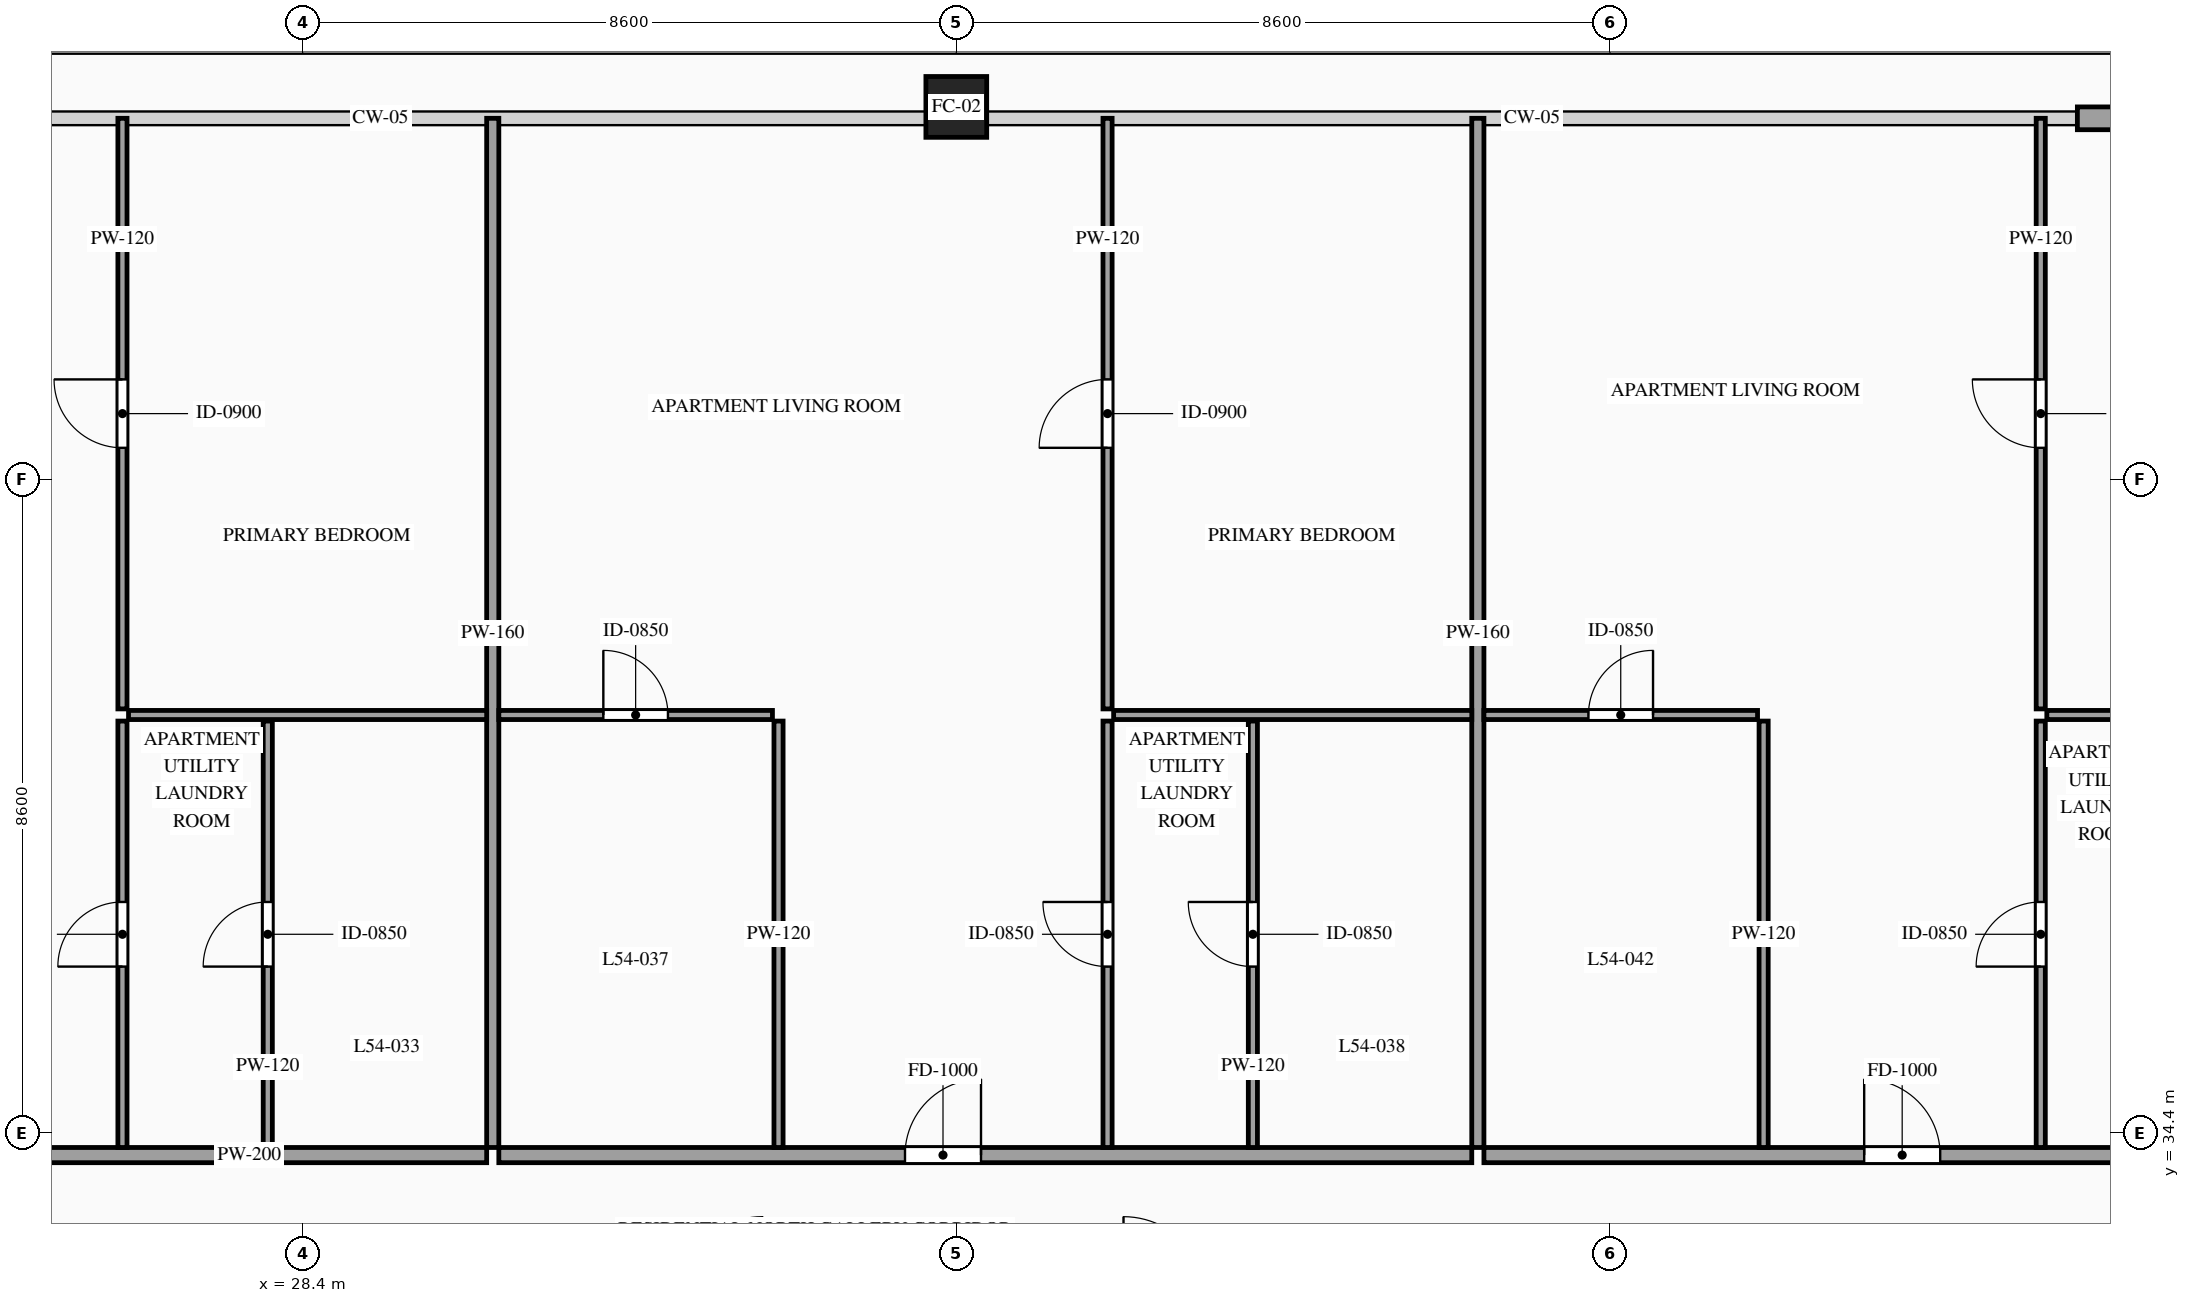
"""IFC4 building model, lengths in metres.
Left out: names, types, materials, properties, quantities, classifications, styles, units other than length and angle.
Written with IfcOpenShell. Run it as: python <this file> out.ifc"""

import sys

from ifc_helpers import new_model, si_unit, direction, frame, frame_2d, origin, origin_2d, place, context, subcontext, project, spatial, rectangle, hollow_rectangle, extrude, source, transform, mapped, element, fill, save


model = new_model("IFC4")
c1 = context("Model", 3, precision=1e-05, world=origin(), true_north=direction((0.0, 1.0)))
c2 = subcontext(c1, "Body", "Model", "MODEL_VIEW")
j1 = project(units=[si_unit("LENGTHUNIT", "METRE"), si_unit("PLANEANGLEUNIT", "RADIAN")], contexts=[c1])
p1 = place(None, origin())
s1 = spatial("IfcSite", under=j1, at=p1, CompositionType="ELEMENT")
p2 = place(p1, origin())
s2 = spatial("IfcBuilding", under=s1, at=p2, CompositionType="ELEMENT")
p3 = place(p2, frame((0.0, 0.0, 205.5)))
s3 = spatial("IfcBuildingStorey", under=s2, at=p3, CompositionType="ELEMENT", Elevation=205.5)
m1 = source(origin(), c2, "Body", "SweptSolid", [
    extrude(hollow_rectangle(XDim=0.8, YDim=0.8, WallThickness=0.036, at=origin_2d()), origin(), (0.0, 0.0, 1.0), 3.5),
])
p4 = place(p3, frame((37.0, 47.9, 0.0), z_axis=(0.0, 0.0, 1.0), x_axis=(1.0, 0.0, 0.0)))
e1 = element("IfcColumn", 1, at=p4, inside=s3, PredefinedType="COLUMN", context=c2, shape_type="MappedRepresentation", body=[
    mapped(m1, transform((0.0, 0.0, 0.0), scale=1.0)),
])
m2 = source(origin(), c2, "Body", "SweptSolid", [
    extrude(rectangle(XDim=3.05, YDim=0.3, at=frame_2d((1.525, 0.0))), origin(), (0.0, 0.0, 1.0), 2.835),
])
p5 = place(p3, frame((51.75, 47.75, 0.0), z_axis=(0.0, 0.0, 1.0), x_axis=(1.0, 0.0, 0.0)))
e2 = element("IfcWall", 2, at=p5, inside=s3, PredefinedType="SOLIDWALL", context=c2, shape_type="MappedRepresentation", body=[
    mapped(m2, transform((0.0, 0.0, 0.0), scale=1.0)),
])
p6 = place(p3, frame((17.94, 34.11, 0.0), z_axis=(0.0, 0.0, 1.0), x_axis=(1.0, 0.0, 0.0)))
e3 = element("IfcWall", 3, at=p6, inside=s3, PredefinedType="PARTITIONING", context=c2, shape_type="SweptSolid", body=[
    extrude(rectangle(XDim=12.881, YDim=0.2, at=frame_2d((6.44, 0.0))), origin(), (0.0, 0.0, 1.0), 3.28),
])
p7 = place(p6, frame((5.385, 0.0, 0.0)))
e4 = element("IfcOpeningElement", 4, at=p7, cuts=e3, PredefinedType="OPENING", context=c2, shape_type="SweptSolid", body=[
    extrude(rectangle(XDim=1.0, YDim=2.2, at=frame_2d((0.5, 1.1))), frame((0.0, 0.115, 0.0), z_axis=(0.0, -1.0, 0.0), x_axis=(1.0, 0.0, 0.0)), (0.0, 0.0, 1.0), 0.23),
])
m3 = source(origin(), c2, "Body", "SweptSolid", [
    extrude(rectangle(XDim=13.54, YDim=0.16, at=frame_2d((6.77, 0.0))), origin(), (0.0, 0.0, 1.0), 3.28),
])
p8 = place(p3, frame((30.901, 34.21, 0.0), z_axis=(0.0, 0.0, 1.0), x_axis=(0.0, 1.0, 0.0)))
e5 = element("IfcWall", 5, at=p8, inside=s3, PredefinedType="PARTITIONING", context=c2, shape_type="MappedRepresentation", body=[
    mapped(m3, transform((0.0, 0.0, 0.0), scale=1.0)),
])
p9 = place(p3, frame((27.941, 34.21, 0.0), z_axis=(0.0, 0.0, 1.0), x_axis=(0.0, 1.0, 0.0)))
e6 = element("IfcWall", 6, at=p9, inside=s3, PredefinedType="PARTITIONING", context=c2, shape_type="SweptSolid", body=[
    extrude(rectangle(XDim=5.61, YDim=0.12, at=frame_2d((2.805, 0.0))), origin(), (0.0, 0.0, 1.0), 3.28),
])
p10 = place(p9, frame((2.38, 0.0, 0.0)))
e7 = element("IfcOpeningElement", 7, at=p10, cuts=e6, PredefinedType="OPENING", context=c2, shape_type="SweptSolid", body=[
    extrude(rectangle(XDim=0.85, YDim=2.1, at=frame_2d((0.425, 1.05))), frame((0.0, 0.075, 0.0), z_axis=(0.0, -1.0, 0.0), x_axis=(1.0, 0.0, 0.0)), (0.0, 0.0, 1.0), 0.15),
])
m4 = source(origin(), c2, "Body", "SweptSolid", [
    extrude(rectangle(XDim=4.712, YDim=0.12, at=frame_2d((2.356, 0.0))), origin(), (0.0, 0.0, 1.0), 2.875),
])
p11 = place(p3, frame((26.109, 39.9, 0.0), z_axis=(0.0, 0.0, 1.0), x_axis=(1.0, 0.0, 0.0)))
e8 = element("IfcWall", 8, at=p11, inside=s3, PredefinedType="PARTITIONING", context=c2, shape_type="MappedRepresentation", body=[
    mapped(m4, transform((0.0, 0.0, 0.0), scale=1.0)),
])
p12 = place(p3, frame((26.029, 39.98, 0.0), z_axis=(0.0, 0.0, 1.0), x_axis=(0.0, 1.0, 0.0)))
e9 = element("IfcWall", 9, at=p12, inside=s3, PredefinedType="PARTITIONING", context=c2, shape_type="SweptSolid", body=[
    extrude(rectangle(XDim=7.77, YDim=0.12, at=frame_2d((3.885, 0.0))), origin(), (0.0, 0.0, 1.0), 3.28),
])
p13 = place(p12, frame((3.435, 0.0, 0.0)))
e10 = element("IfcOpeningElement", 10, at=p13, cuts=e9, PredefinedType="OPENING", context=c2, shape_type="SweptSolid", body=[
    extrude(rectangle(XDim=0.9, YDim=2.15, at=frame_2d((0.45, 1.075))), frame((0.0, 0.075, 0.0), z_axis=(0.0, -1.0, 0.0), x_axis=(1.0, 0.0, 0.0)), (0.0, 0.0, 1.0), 0.15),
])
p14 = place(p3, frame((26.029, 34.21, 0.0), z_axis=(0.0, 0.0, 1.0), x_axis=(0.0, 1.0, 0.0)))
e11 = element("IfcWall", 11, at=p14, inside=s3, PredefinedType="PARTITIONING", context=c2, shape_type="SweptSolid", body=[
    extrude(rectangle(XDim=5.61, YDim=0.12, at=frame_2d((2.805, 0.0))), origin(), (0.0, 0.0, 1.0), 3.28),
])
p15 = place(p14, frame((2.38, 0.0, 0.0)))
e12 = element("IfcOpeningElement", 12, at=p15, cuts=e11, PredefinedType="OPENING", context=c2, shape_type="SweptSolid", body=[
    extrude(rectangle(XDim=0.85, YDim=2.1, at=frame_2d((0.425, 1.05))), frame((0.0, 0.075, 0.0), z_axis=(0.0, -1.0, 0.0), x_axis=(1.0, 0.0, 0.0)), (0.0, 0.0, 1.0), 0.15),
])
p16 = place(p3, frame((30.981, 34.11, 0.0), z_axis=(0.0, 0.0, 1.0), x_axis=(1.0, 0.0, 0.0)))
e13 = element("IfcWall", 13, at=p16, inside=s3, PredefinedType="PARTITIONING", context=c2, shape_type="SweptSolid", body=[
    extrude(rectangle(XDim=12.801, YDim=0.2, at=frame_2d((6.4, 0.0))), origin(), (0.0, 0.0, 1.0), 3.28),
])
p17 = place(p16, frame((5.344, 0.0, 0.0)))
e14 = element("IfcOpeningElement", 14, at=p17, cuts=e13, PredefinedType="OPENING", context=c2, shape_type="SweptSolid", body=[
    extrude(rectangle(XDim=1.0, YDim=2.2, at=frame_2d((0.5, 1.1))), frame((0.0, 0.115, 0.0), z_axis=(0.0, -1.0, 0.0), x_axis=(1.0, 0.0, 0.0)), (0.0, 0.0, 1.0), 0.23),
])
p18 = place(p3, frame((43.862, 34.21, 0.0), z_axis=(0.0, 0.0, 1.0), x_axis=(0.0, 1.0, 0.0)))
e15 = element("IfcWall", 15, at=p18, inside=s3, PredefinedType="PARTITIONING", context=c2, shape_type="MappedRepresentation", body=[
    mapped(m3, transform((0.0, 0.0, 0.0), scale=1.0)),
])
p19 = place(p3, frame((30.981, 39.9, 0.0), z_axis=(0.0, 0.0, 1.0), x_axis=(1.0, 0.0, 0.0)))
e16 = element("IfcWall", 16, at=p19, inside=s3, PredefinedType="PARTITIONING", context=c2, shape_type="SweptSolid", body=[
    extrude(rectangle(XDim=3.6, YDim=0.12, at=frame_2d((1.8, 0.0))), origin(), (0.0, 0.0, 1.0), 2.875),
])
p20 = place(p19, frame((1.375, 0.0, 0.0)))
e17 = element("IfcOpeningElement", 17, at=p20, cuts=e16, PredefinedType="OPENING", context=c2, shape_type="SweptSolid", body=[
    extrude(rectangle(XDim=0.85, YDim=2.1, at=frame_2d((0.425, 1.05))), frame((0.0, 0.075, 0.0), z_axis=(0.0, -1.0, 0.0), x_axis=(1.0, 0.0, 0.0)), (0.0, 0.0, 1.0), 0.15),
])
m5 = source(origin(), c2, "Body", "SweptSolid", [
    extrude(rectangle(XDim=5.61, YDim=0.12, at=frame_2d((2.805, 0.0))), origin(), (0.0, 0.0, 1.0), 3.28),
])
p21 = place(p3, frame((34.661, 34.21, 0.0), z_axis=(0.0, 0.0, 1.0), x_axis=(0.0, 1.0, 0.0)))
e18 = element("IfcWall", 18, at=p21, inside=s3, PredefinedType="PARTITIONING", context=c2, shape_type="MappedRepresentation", body=[
    mapped(m5, transform((0.0, 0.0, 0.0), scale=1.0)),
])
p22 = place(p3, frame((40.902, 34.21, 0.0), z_axis=(0.0, 0.0, 1.0), x_axis=(0.0, 1.0, 0.0)))
e19 = element("IfcWall", 19, at=p22, inside=s3, PredefinedType="PARTITIONING", context=c2, shape_type="SweptSolid", body=[
    extrude(rectangle(XDim=5.61, YDim=0.12, at=frame_2d((2.805, 0.0))), origin(), (0.0, 0.0, 1.0), 3.28),
])
p23 = place(p22, frame((2.38, 0.0, 0.0)))
e20 = element("IfcOpeningElement", 20, at=p23, cuts=e19, PredefinedType="OPENING", context=c2, shape_type="SweptSolid", body=[
    extrude(rectangle(XDim=0.85, YDim=2.1, at=frame_2d((0.425, 1.05))), frame((0.0, 0.075, 0.0), z_axis=(0.0, -1.0, 0.0), x_axis=(1.0, 0.0, 0.0)), (0.0, 0.0, 1.0), 0.15),
])
m6 = source(origin(), c2, "Body", "SweptSolid", [
    extrude(rectangle(XDim=4.712, YDim=0.12, at=frame_2d((2.356, 0.0))), origin(), (0.0, 0.0, 1.0), 2.875),
])
p24 = place(p3, frame((39.07, 39.9, 0.0), z_axis=(0.0, 0.0, 1.0), x_axis=(1.0, 0.0, 0.0)))
e21 = element("IfcWall", 21, at=p24, inside=s3, PredefinedType="PARTITIONING", context=c2, shape_type="MappedRepresentation", body=[
    mapped(m6, transform((0.0, 0.0, 0.0), scale=1.0)),
])
p25 = place(p3, frame((38.99, 39.98, 0.0), z_axis=(0.0, 0.0, 1.0), x_axis=(0.0, 1.0, 0.0)))
e22 = element("IfcWall", 22, at=p25, inside=s3, PredefinedType="PARTITIONING", context=c2, shape_type="SweptSolid", body=[
    extrude(rectangle(XDim=7.77, YDim=0.12, at=frame_2d((3.885, 0.0))), origin(), (0.0, 0.0, 1.0), 3.28),
])
p26 = place(p25, frame((3.435, 0.0, 0.0)))
e23 = element("IfcOpeningElement", 23, at=p26, cuts=e22, PredefinedType="OPENING", context=c2, shape_type="SweptSolid", body=[
    extrude(rectangle(XDim=0.9, YDim=2.15, at=frame_2d((0.45, 1.075))), frame((0.0, 0.075, 0.0), z_axis=(0.0, -1.0, 0.0), x_axis=(1.0, 0.0, 0.0)), (0.0, 0.0, 1.0), 0.15),
])
p27 = place(p3, frame((38.99, 34.21, 0.0), z_axis=(0.0, 0.0, 1.0), x_axis=(0.0, 1.0, 0.0)))
e24 = element("IfcWall", 24, at=p27, inside=s3, PredefinedType="PARTITIONING", context=c2, shape_type="SweptSolid", body=[
    extrude(rectangle(XDim=5.61, YDim=0.12, at=frame_2d((2.805, 0.0))), origin(), (0.0, 0.0, 1.0), 3.28),
])
p28 = place(p27, frame((2.38, 0.0, 0.0)))
e25 = element("IfcOpeningElement", 25, at=p28, cuts=e24, PredefinedType="OPENING", context=c2, shape_type="SweptSolid", body=[
    extrude(rectangle(XDim=0.85, YDim=2.1, at=frame_2d((0.425, 1.05))), frame((0.0, 0.075, 0.0), z_axis=(0.0, -1.0, 0.0), x_axis=(1.0, 0.0, 0.0)), (0.0, 0.0, 1.0), 0.15),
])
p29 = place(p3, frame((43.942, 34.11, 0.0), z_axis=(0.0, 0.0, 1.0), x_axis=(1.0, 0.0, 0.0)))
e26 = element("IfcWall", 26, at=p29, inside=s3, PredefinedType="PARTITIONING", context=c2, shape_type="SweptSolid", body=[
    extrude(rectangle(XDim=12.118, YDim=0.2, at=frame_2d((6.059, 0.0))), origin(), (0.0, 0.0, 1.0), 3.28),
])
p30 = place(p29, frame((5.003, 0.0, 0.0)))
e27 = element("IfcOpeningElement", 27, at=p30, cuts=e26, PredefinedType="OPENING", context=c2, shape_type="SweptSolid", body=[
    extrude(rectangle(XDim=1.0, YDim=2.2, at=frame_2d((0.5, 1.1))), frame((0.0, 0.115, 0.0), z_axis=(0.0, -1.0, 0.0), x_axis=(1.0, 0.0, 0.0)), (0.0, 0.0, 1.0), 0.23),
])
p31 = place(p3, frame((43.942, 39.9, 0.0), z_axis=(0.0, 0.0, 1.0), x_axis=(1.0, 0.0, 0.0)))
e28 = element("IfcWall", 28, at=p31, inside=s3, PredefinedType="PARTITIONING", context=c2, shape_type="SweptSolid", body=[
    extrude(rectangle(XDim=3.6, YDim=0.12, at=frame_2d((1.8, 0.0))), origin(), (0.0, 0.0, 1.0), 2.875),
])
p32 = place(p31, frame((1.375, 0.0, 0.0)))
e29 = element("IfcOpeningElement", 29, at=p32, cuts=e28, PredefinedType="OPENING", context=c2, shape_type="SweptSolid", body=[
    extrude(rectangle(XDim=0.85, YDim=2.1, at=frame_2d((0.425, 1.05))), frame((0.0, 0.075, 0.0), z_axis=(0.0, -1.0, 0.0), x_axis=(1.0, 0.0, 0.0)), (0.0, 0.0, 1.0), 0.15),
])
p33 = place(p3, frame((47.622, 34.21, 0.0), z_axis=(0.0, 0.0, 1.0), x_axis=(0.0, 1.0, 0.0)))
e30 = element("IfcWall", 30, at=p33, inside=s3, PredefinedType="PARTITIONING", context=c2, shape_type="MappedRepresentation", body=[
    mapped(m5, transform((0.0, 0.0, 0.0), scale=1.0)),
])
m7 = source(origin(), c2, "Body", "SweptSolid", [
    extrude(rectangle(XDim=4.712, YDim=0.12, at=frame_2d((2.356, 0.0))), origin(), (0.0, 0.0, 1.0), 3.28),
])
p34 = place(p3, frame((51.348, 39.9, 0.0), z_axis=(0.0, 0.0, 1.0), x_axis=(1.0, 0.0, 0.0)))
e31 = element("IfcWall", 31, at=p34, inside=s3, PredefinedType="PARTITIONING", context=c2, shape_type="MappedRepresentation", body=[
    mapped(m7, transform((0.0, 0.0, 0.0), scale=1.0)),
])
p35 = place(p3, frame((51.268, 39.98, 0.0), z_axis=(0.0, 0.0, 1.0), x_axis=(0.0, 1.0, 0.0)))
e32 = element("IfcWall", 32, at=p35, inside=s3, PredefinedType="PARTITIONING", context=c2, shape_type="SweptSolid", body=[
    extrude(rectangle(XDim=7.77, YDim=0.12, at=frame_2d((3.885, 0.0))), origin(), (0.0, 0.0, 1.0), 3.28),
])
p36 = place(p35, frame((3.435, 0.0, 0.0)))
e33 = element("IfcOpeningElement", 33, at=p36, cuts=e32, PredefinedType="OPENING", context=c2, shape_type="SweptSolid", body=[
    extrude(rectangle(XDim=0.9, YDim=2.15, at=frame_2d((0.45, 1.075))), frame((0.0, 0.075, 0.0), z_axis=(0.0, -1.0, 0.0), x_axis=(1.0, 0.0, 0.0)), (0.0, 0.0, 1.0), 0.15),
])
p37 = place(p3, frame((51.268, 34.21, 0.0), z_axis=(0.0, 0.0, 1.0), x_axis=(0.0, 1.0, 0.0)))
e34 = element("IfcWall", 34, at=p37, inside=s3, PredefinedType="PARTITIONING", context=c2, shape_type="SweptSolid", body=[
    extrude(rectangle(XDim=5.61, YDim=0.12, at=frame_2d((2.805, 0.0))), origin(), (0.0, 0.0, 1.0), 3.28),
])
p38 = place(p37, frame((2.38, 0.0, 0.0)))
e35 = element("IfcOpeningElement", 35, at=p38, cuts=e34, PredefinedType="OPENING", context=c2, shape_type="SweptSolid", body=[
    extrude(rectangle(XDim=0.85, YDim=2.1, at=frame_2d((0.425, 1.05))), frame((0.0, 0.075, 0.0), z_axis=(0.0, -1.0, 0.0), x_axis=(1.0, 0.0, 0.0)), (0.0, 0.0, 1.0), 0.15),
])
m8 = source(origin(), c2, "Body", "SweptSolid", [
    extrude(rectangle(XDim=0.85, YDim=2.1, at=frame_2d((0.425, 1.05))), frame((0.0, 0.025, 0.0), z_axis=(0.0, -1.0, 0.0), x_axis=(1.0, 0.0, 0.0)), (0.0, 0.0, 1.0), 0.05),
])
p39 = place(p10, origin())
e36 = element("IfcDoor", 36, at=p39, inside=s3, OperationType="SINGLE_SWING_LEFT", PredefinedType="DOOR", context=c2, shape_type="MappedRepresentation", body=[
    mapped(m8, transform((0.0, 0.0, 0.0), scale=1.0)),
])
fill(e7, e36)
m9 = source(origin(), c2, "Body", "SweptSolid", [
    extrude(rectangle(XDim=0.9, YDim=2.15, at=frame_2d((0.45, 1.075))), frame((0.0, 0.025, 0.0), z_axis=(0.0, -1.0, 0.0), x_axis=(1.0, 0.0, 0.0)), (0.0, 0.0, 1.0), 0.05),
])
p40 = place(p13, origin())
e37 = element("IfcDoor", 37, at=p40, inside=s3, OperationType="SINGLE_SWING_RIGHT", PredefinedType="DOOR", context=c2, shape_type="MappedRepresentation", body=[
    mapped(m9, transform((0.0, 0.0, 0.0), scale=1.0)),
])
fill(e10, e37)
p41 = place(p15, origin())
e38 = element("IfcDoor", 38, at=p41, inside=s3, OperationType="SINGLE_SWING_LEFT", PredefinedType="DOOR", context=c2, shape_type="MappedRepresentation", body=[
    mapped(m8, transform((0.0, 0.0, 0.0), scale=1.0)),
])
fill(e12, e38)
m10 = source(origin(), c2, "Body", "SweptSolid", [
    extrude(rectangle(XDim=1.0, YDim=2.2, at=frame_2d((0.5, 1.1))), frame((0.0, 0.025, 0.0), z_axis=(0.0, -1.0, 0.0), x_axis=(1.0, 0.0, 0.0)), (0.0, 0.0, 1.0), 0.05),
])
p42 = place(p17, origin())
e39 = element("IfcDoor", 39, at=p42, inside=s3, OperationType="SINGLE_SWING_RIGHT", PredefinedType="DOOR", context=c2, shape_type="MappedRepresentation", body=[
    mapped(m10, transform((0.0, 0.0, 0.0), scale=1.0)),
])
fill(e14, e39)
p43 = place(p20, origin())
e40 = element("IfcDoor", 40, at=p43, inside=s3, OperationType="SINGLE_SWING_LEFT", PredefinedType="DOOR", context=c2, shape_type="MappedRepresentation", body=[
    mapped(m8, transform((0.0, 0.0, 0.0), scale=1.0)),
])
fill(e17, e40)
p44 = place(p23, origin())
e41 = element("IfcDoor", 41, at=p44, inside=s3, OperationType="SINGLE_SWING_RIGHT", PredefinedType="DOOR", context=c2, shape_type="MappedRepresentation", body=[
    mapped(m8, transform((0.0, 0.0, 0.0), scale=1.0)),
])
fill(e20, e41)
p45 = place(p26, origin())
e42 = element("IfcDoor", 42, at=p45, inside=s3, OperationType="SINGLE_SWING_LEFT", PredefinedType="DOOR", context=c2, shape_type="MappedRepresentation", body=[
    mapped(m9, transform((0.0, 0.0, 0.0), scale=1.0)),
])
fill(e23, e42)
p46 = place(p28, origin())
e43 = element("IfcDoor", 43, at=p46, inside=s3, OperationType="SINGLE_SWING_RIGHT", PredefinedType="DOOR", context=c2, shape_type="MappedRepresentation", body=[
    mapped(m8, transform((0.0, 0.0, 0.0), scale=1.0)),
])
fill(e25, e43)
p47 = place(p30, origin())
e44 = element("IfcDoor", 44, at=p47, inside=s3, OperationType="SINGLE_SWING_LEFT", PredefinedType="DOOR", context=c2, shape_type="MappedRepresentation", body=[
    mapped(m10, transform((0.0, 0.0, 0.0), scale=1.0)),
])
fill(e27, e44)
p48 = place(p32, origin())
e45 = element("IfcDoor", 45, at=p48, inside=s3, OperationType="SINGLE_SWING_RIGHT", PredefinedType="DOOR", context=c2, shape_type="MappedRepresentation", body=[
    mapped(m8, transform((0.0, 0.0, 0.0), scale=1.0)),
])
fill(e29, e45)
p49 = place(p36, origin())
e46 = element("IfcDoor", 46, at=p49, inside=s3, OperationType="SINGLE_SWING_RIGHT", PredefinedType="DOOR", context=c2, shape_type="MappedRepresentation", body=[
    mapped(m9, transform((0.0, 0.0, 0.0), scale=1.0)),
])
fill(e33, e46)
p50 = place(p38, origin())
e47 = element("IfcDoor", 47, at=p50, inside=s3, OperationType="SINGLE_SWING_LEFT", PredefinedType="DOOR", context=c2, shape_type="MappedRepresentation", body=[
    mapped(m8, transform((0.0, 0.0, 0.0), scale=1.0)),
])
fill(e35, e47)
save(model, sys.argv[1])
